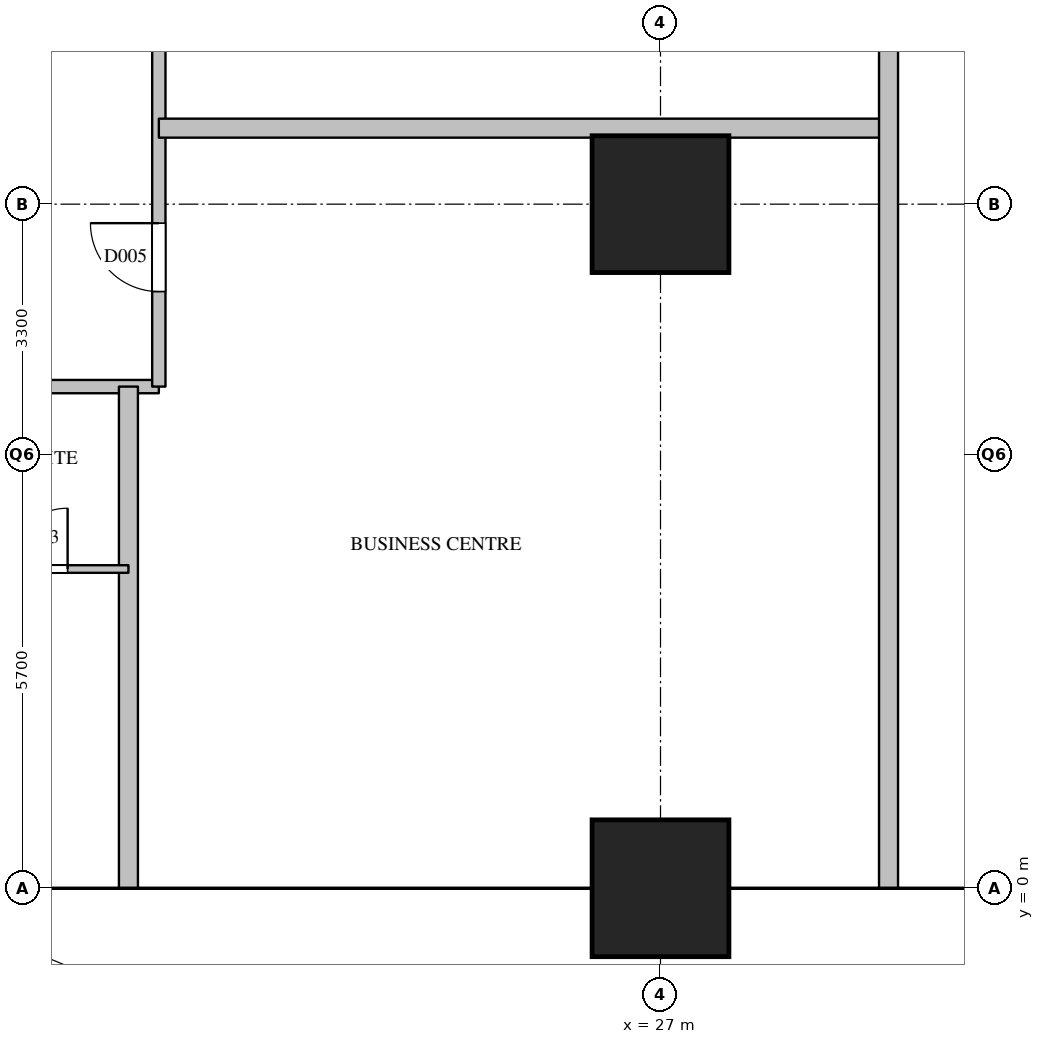
"""IFC4 building model, lengths in metres.
Left out: names, types, materials, properties, quantities, classifications, styles, units other than length and angle.
Written with IfcOpenShell. Run it as: python <this file> out.ifc"""

import sys

from ifc_helpers import new_model, si_unit, direction, frame, frame_2d, origin, origin_2d, place, context, subcontext, project, spatial, rectangle, extrude, element, fill, save


model = new_model("IFC4")
c1 = context("Model", 3, precision=1e-05, world=origin(), true_north=direction((0.0, 1.0)))
c2 = subcontext(c1, "Body", "Model", "MODEL_VIEW")
j1 = project(units=[si_unit("LENGTHUNIT", "METRE"), si_unit("PLANEANGLEUNIT", "RADIAN")], contexts=[c1])
p1 = place(None, origin())
s1 = spatial("IfcSite", under=j1, at=p1, CompositionType="ELEMENT")
p2 = place(p1, origin())
s2 = spatial("IfcBuilding", under=s1, at=p2, CompositionType="ELEMENT")
p3 = place(p2, frame((0.0, 0.0, 50.0)))
s3 = spatial("IfcBuildingStorey", under=s2, at=p3, CompositionType="ELEMENT", Elevation=50.0)
for number, where, z_axis, x_axis in (
    (1, (27.0, 0.0, 0.0), (0.0, 0.0, 1.0), (1.0, 0.0, 0.0)),
    (2, (27.0, 9.0, 0.0), (0.0, 0.0, 1.0), (1.0, 0.0, 0.0)),
):
    element("IfcColumn", number, at=place(p3, frame(where, z_axis=z_axis, x_axis=x_axis)), inside=s3, PredefinedType="COLUMN", context=c2, shape_type="SweptSolid", body=[
        extrude(rectangle(XDim=1.8, YDim=1.8, at=origin_2d()), origin(), (0.0, 0.0, 1.0), 3.8),
    ])
p4 = place(p3, frame((6.6, 6.6, 0.0), z_axis=(0.0, 0.0, 1.0), x_axis=(1.0, 0.0, 0.0)))
e3 = element("IfcWall", 3, at=p4, inside=s3, PredefinedType="PARTITIONING", context=c2, shape_type="SweptSolid", body=[
    extrude(rectangle(XDim=13.8, YDim=0.175, at=frame_2d((6.9, 0.0))), origin(), (0.0, 0.0, 1.0), 3.5),
])
p5 = place(p4, frame((6.7, 0.0, 0.0)))
e4 = element("IfcOpeningElement", 4, at=p5, cuts=e3, PredefinedType="OPENING", context=c2, shape_type="SweptSolid", body=[
    extrude(rectangle(XDim=1.0, YDim=2.1, at=frame_2d((0.5, 1.05))), frame((0.0, 0.097, 0.0), z_axis=(0.0, -1.0, 0.0), x_axis=(1.0, 0.0, 0.0)), (0.0, 0.0, 1.0), 0.195),
])
p6 = place(p4, frame((1.25, 0.0, 0.0)))
e5 = element("IfcOpeningElement", 5, at=p6, cuts=e3, PredefinedType="OPENING", context=c2, shape_type="SweptSolid", body=[
    extrude(rectangle(XDim=0.9, YDim=2.1, at=frame_2d((0.45, 1.05))), frame((0.0, 0.097, 0.0), z_axis=(0.0, -1.0, 0.0), x_axis=(1.0, 0.0, 0.0)), (0.0, 0.0, 1.0), 0.195),
])
p7 = place(p3, frame((20.4, 6.6, 0.0), z_axis=(0.0, 0.0, 1.0), x_axis=(0.0, 1.0, 0.0)))
e6 = element("IfcWall", 6, at=p7, inside=s3, PredefinedType="PARTITIONING", context=c2, shape_type="SweptSolid", body=[
    extrude(rectangle(XDim=12.65, YDim=0.175, at=frame_2d((6.325, 0.0))), origin(), (0.0, 0.0, 1.0), 3.5),
])
p8 = place(p7, frame((1.25, 0.0, 0.0)))
e7 = element("IfcOpeningElement", 7, at=p8, cuts=e6, PredefinedType="OPENING", context=c2, shape_type="SweptSolid", body=[
    extrude(rectangle(XDim=0.9, YDim=2.1, at=frame_2d((0.45, 1.05))), frame((0.0, 0.097, 0.0), z_axis=(0.0, -1.0, 0.0), x_axis=(1.0, 0.0, 0.0)), (0.0, 0.0, 1.0), 0.195),
])
p9 = place(p3, frame((20.4, 10.0, 0.0), z_axis=(0.0, 0.0, 1.0), x_axis=(1.0, 0.0, 0.0)))
e8 = element("IfcWall", 8, at=p9, inside=s3, PredefinedType="PARTITIONING", context=c2, shape_type="SweptSolid", body=[
    extrude(rectangle(XDim=9.6, YDim=0.25, at=frame_2d((4.8, 0.0))), origin(), (0.0, 0.0, 1.0), 2.5),
])
p10 = place(p3, frame((20.0, 0.0, 0.0), z_axis=(0.0, 0.0, 1.0), x_axis=(0.0, 1.0, 0.0)))
e9 = element("IfcWall", 9, at=p10, inside=s3, PredefinedType="PARTITIONING", context=c2, shape_type="SweptSolid", body=[
    extrude(rectangle(XDim=6.6, YDim=0.25, at=frame_2d((3.3, 0.0))), origin(), (0.0, 0.0, 1.0), 2.5),
])
p11 = place(p3, frame((30.0, 0.0, 0.0), z_axis=(0.0, 0.0, 1.0), x_axis=(0.0, 1.0, 0.0)))
e10 = element("IfcWall", 10, at=p11, inside=s3, PredefinedType="PARTITIONING", context=c2, shape_type="SweptSolid", body=[
    extrude(rectangle(XDim=19.25, YDim=0.25, at=frame_2d((9.625, 0.0))), origin(), (0.0, 0.0, 1.0), 2.5),
])
p12 = place(p3, frame((17.6, 4.2, 0.0), z_axis=(0.0, 0.0, 1.0), x_axis=(1.0, 0.0, 0.0)))
e11 = element("IfcWall", 11, at=p12, inside=s3, PredefinedType="PARTITIONING", context=c2, shape_type="SweptSolid", body=[
    extrude(rectangle(XDim=2.4, YDim=0.1, at=frame_2d((1.2, 0.0))), origin(), (0.0, 0.0, 1.0), 3.5),
])
p13 = place(p12, frame((0.8, 0.0, 0.0)))
e12 = element("IfcOpeningElement", 12, at=p13, cuts=e11, PredefinedType="OPENING", context=c2, shape_type="SweptSolid", body=[
    extrude(rectangle(XDim=0.8, YDim=2.1, at=frame_2d((0.4, 1.05))), frame((0.0, 0.06, 0.0), z_axis=(0.0, -1.0, 0.0), x_axis=(1.0, 0.0, 0.0)), (0.0, 0.0, 1.0), 0.12),
])
p14 = place(p13, origin())
e13 = element("IfcDoor", 13, at=p14, inside=s3, OperationType="SINGLE_SWING_RIGHT", PredefinedType="DOOR", context=c2, shape_type="SweptSolid", body=[
    extrude(rectangle(XDim=0.8, YDim=2.1, at=frame_2d((0.4, 1.05))), frame((0.0, 0.025, 0.0), z_axis=(0.0, -1.0, 0.0), x_axis=(1.0, 0.0, 0.0)), (0.0, 0.0, 1.0), 0.05),
])
fill(e12, e13)
p15 = place(p8, origin())
e14 = element("IfcDoor", 14, at=p15, inside=s3, OperationType="SINGLE_SWING_RIGHT", PredefinedType="DOOR", context=c2, shape_type="SweptSolid", body=[
    extrude(rectangle(XDim=0.9, YDim=2.1, at=frame_2d((0.45, 1.05))), frame((0.0, 0.025, 0.0), z_axis=(0.0, -1.0, 0.0), x_axis=(1.0, 0.0, 0.0)), (0.0, 0.0, 1.0), 0.05),
])
fill(e7, e14)
save(model, sys.argv[1])
